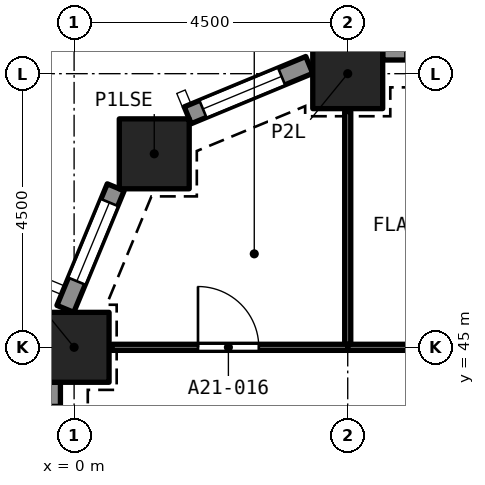
"""IFC4 building model, lengths in metres.
Left out: names, types, materials, properties, quantities, classifications, styles, units other than length and angle.
Written with IfcOpenShell. Run it as: python <this file> out.ifc"""

import sys

from ifc_helpers import new_model, si_unit, direction, frame, frame_2d, origin, origin_2d, place, context, subcontext, project, spatial, rectangle, extrude, element, fill, save


model = new_model("IFC4")
c1 = context("Model", 3, precision=1e-05, world=origin(), true_north=direction((0.0, 1.0)))
c2 = subcontext(c1, "Body", "Model", "MODEL_VIEW")
j1 = project(units=[si_unit("LENGTHUNIT", "METRE"), si_unit("PLANEANGLEUNIT", "RADIAN")], contexts=[c1])
p1 = place(None, origin())
s1 = spatial("IfcSite", under=j1, at=p1, CompositionType="ELEMENT")
p2 = place(p1, origin())
s2 = spatial("IfcBuilding", under=s1, at=p2, CompositionType="ELEMENT")
p3 = place(p2, frame((0.0, 0.0, 80.0)))
s3 = spatial("IfcBuildingStorey", under=s2, at=p3, CompositionType="ELEMENT", Elevation=80.0)
for number, where, z_axis, x_axis in (
    (1, (0.0, 45.0, 0.0), (0.0, 0.0, 1.0), (1.0, 0.0, 0.0)),
    (2, (1.318, 48.182, 0.0), (0.0, 0.0, 1.0), (1.0, 0.0, 0.0)),
    (3, (4.5, 49.5, 0.0), (0.0, 0.0, 1.0), (1.0, 0.0, 0.0)),
):
    element("IfcColumn", number, at=place(p3, frame(where, z_axis=z_axis, x_axis=x_axis)), inside=s3, PredefinedType="COLUMN", context=c2, shape_type="SweptSolid", body=[
        extrude(rectangle(XDim=1.15, YDim=1.15, at=origin_2d()), origin(), (0.0, 0.0, 1.0), 3.2),
    ])
p4 = place(p3, frame((5.075, 49.875, 0.0), z_axis=(0.0, 0.0, 1.0), x_axis=(1.0, 0.0, 0.0)))
e4 = element("IfcWall", 4, at=p4, inside=s3, PredefinedType="SOLIDWALL", context=c2, shape_type="SweptSolid", body=[
    extrude(rectangle(XDim=3.35, YDim=0.3, at=frame_2d((1.675, 0.0))), origin(), (0.0, 0.0, 1.0), 3.2),
])
p5 = place(p4, frame((0.375, 0.0, 0.45)))
e5 = element("IfcOpeningElement", 5, at=p5, cuts=e4, PredefinedType="OPENING", context=c2, shape_type="SweptSolid", body=[
    extrude(rectangle(XDim=2.6, YDim=1.95, at=frame_2d((1.3, 0.975))), frame((0.0, 0.16, 0.0), z_axis=(0.0, -1.0, 0.0), x_axis=(1.0, 0.0, 0.0)), (0.0, 0.0, 1.0), 0.32),
])
p6 = place(p3, frame((1.869, 48.816, 0.0), z_axis=(0.0, 0.0, 1.0), x_axis=(0.923862802911, 0.382723818695, 0.0)))
e6 = element("IfcWall", 6, at=p6, inside=s3, PredefinedType="SOLIDWALL", context=c2, shape_type="SweptSolid", body=[
    extrude(rectangle(XDim=2.164, YDim=0.3, at=frame_2d((1.082, 0.0))), origin(), (0.0, 0.0, 1.0), 3.2),
])
p7 = place(p6, frame((0.271, 0.0, 0.45)))
e7 = element("IfcOpeningElement", 7, at=p7, cuts=e6, PredefinedType="OPENING", context=c2, shape_type="SweptSolid", body=[
    extrude(rectangle(XDim=1.4, YDim=1.95, at=frame_2d((0.7, 0.975))), frame((0.0, 0.16, 0.0), z_axis=(0.0, -1.0, 0.0), x_axis=(1.0, 0.0, 0.0)), (0.0, 0.0, 1.0), 0.32),
])
p8 = place(p3, frame((-0.144, 45.632, 0.0), z_axis=(0.0, 0.0, 1.0), x_axis=(0.382723818695, 0.923862802911, 0.0)))
e8 = element("IfcWall", 8, at=p8, inside=s3, PredefinedType="SOLIDWALL", context=c2, shape_type="SweptSolid", body=[
    extrude(rectangle(XDim=2.164, YDim=0.3, at=frame_2d((1.082, 0.0))), origin(), (0.0, 0.0, 1.0), 3.2),
])
p9 = place(p8, frame((0.493, 0.0, 0.45)))
e9 = element("IfcOpeningElement", 9, at=p9, cuts=e8, PredefinedType="OPENING", context=c2, shape_type="SweptSolid", body=[
    extrude(rectangle(XDim=1.4, YDim=1.95, at=frame_2d((0.7, 0.975))), frame((0.0, 0.16, 0.0), z_axis=(0.0, -1.0, 0.0), x_axis=(1.0, 0.0, 0.0)), (0.0, 0.0, 1.0), 0.32),
])
p10 = place(p3, frame((-0.375, 41.075, 0.0), z_axis=(0.0, 0.0, 1.0), x_axis=(0.0, 1.0, 0.0)))
e10 = element("IfcWall", 10, at=p10, inside=s3, PredefinedType="SOLIDWALL", context=c2, shape_type="SweptSolid", body=[
    extrude(rectangle(XDim=3.35, YDim=0.3, at=frame_2d((1.675, 0.0))), origin(), (0.0, 0.0, 1.0), 3.2),
])
p11 = place(p10, frame((0.375, 0.0, 0.45)))
e11 = element("IfcOpeningElement", 11, at=p11, cuts=e10, PredefinedType="OPENING", context=c2, shape_type="SweptSolid", body=[
    extrude(rectangle(XDim=2.6, YDim=1.95, at=frame_2d((1.3, 0.975))), frame((0.0, 0.16, 0.0), z_axis=(0.0, -1.0, 0.0), x_axis=(1.0, 0.0, 0.0)), (0.0, 0.0, 1.0), 0.32),
])
p12 = place(p3, frame((4.5, 45.0, 0.0), z_axis=(0.0, 0.0, 1.0), x_axis=(1.0, 0.0, 0.0)))
e12 = element("IfcWall", 12, at=p12, inside=s3, PredefinedType="PARTITIONING", context=c2, shape_type="SweptSolid", body=[
    extrude(rectangle(XDim=4.5, YDim=0.1, at=frame_2d((2.25, 0.0))), origin(), (0.0, 0.0, 1.0), 2.9),
])
p13 = place(p12, frame((1.8, 0.0, 0.0)))
e13 = element("IfcOpeningElement", 13, at=p13, cuts=e12, PredefinedType="OPENING", context=c2, shape_type="SweptSolid", body=[
    extrude(rectangle(XDim=0.9, YDim=2.1, at=frame_2d((0.45, 1.05))), frame((0.0, 0.06, 0.0), z_axis=(0.0, -1.0, 0.0), x_axis=(1.0, 0.0, 0.0)), (0.0, 0.0, 1.0), 0.12),
])
p14 = place(p3, frame((4.5, 45.05, 0.0), z_axis=(0.0, 0.0, 1.0), x_axis=(0.0, 1.0, 0.0)))
e14 = element("IfcWall", 14, at=p14, inside=s3, PredefinedType="PARTITIONING", context=c2, shape_type="SweptSolid", body=[
    extrude(rectangle(XDim=3.828, YDim=0.1, at=frame_2d((1.914, 0.0))), origin(), (0.0, 0.0, 1.0), 2.9),
])
p15 = place(p3, frame((0.622, 45.0, 0.0), z_axis=(0.0, 0.0, 1.0), x_axis=(1.0, 0.0, 0.0)))
e15 = element("IfcWall", 15, at=p15, inside=s3, PredefinedType="PARTITIONING", context=c2, shape_type="SweptSolid", body=[
    extrude(rectangle(XDim=3.878, YDim=0.1, at=frame_2d((1.939, 0.0))), origin(), (0.0, 0.0, 1.0), 2.9),
])
p16 = place(p15, frame((1.415, 0.0, 0.0)))
e16 = element("IfcOpeningElement", 16, at=p16, cuts=e15, PredefinedType="OPENING", context=c2, shape_type="SweptSolid", body=[
    extrude(rectangle(XDim=1.0, YDim=2.1, at=frame_2d((0.5, 1.05))), frame((0.0, 0.06, 0.0), z_axis=(0.0, -1.0, 0.0), x_axis=(1.0, 0.0, 0.0)), (0.0, 0.0, 1.0), 0.12),
])
p17 = place(p7, origin())
e17 = element("IfcWindow", 17, at=p17, inside=s3, PartitioningType="SINGLE_PANEL", PredefinedType="WINDOW", context=c2, shape_type="SweptSolid", body=[
    extrude(rectangle(XDim=1.4, YDim=1.95, at=frame_2d((0.7, 0.975))), frame((0.0, 0.03, 0.0), z_axis=(0.0, -1.0, 0.0), x_axis=(1.0, 0.0, 0.0)), (0.0, 0.0, 1.0), 0.06),
])
fill(e7, e17)
p18 = place(p9, origin())
e18 = element("IfcWindow", 18, at=p18, inside=s3, PartitioningType="SINGLE_PANEL", PredefinedType="WINDOW", context=c2, shape_type="SweptSolid", body=[
    extrude(rectangle(XDim=1.4, YDim=1.95, at=frame_2d((0.7, 0.975))), frame((0.0, 0.03, 0.0), z_axis=(0.0, -1.0, 0.0), x_axis=(1.0, 0.0, 0.0)), (0.0, 0.0, 1.0), 0.06),
])
fill(e9, e18)
p19 = place(p16, origin())
e19 = element("IfcDoor", 19, at=p19, inside=s3, OperationType="SINGLE_SWING_LEFT", PredefinedType="DOOR", context=c2, shape_type="SweptSolid", body=[
    extrude(rectangle(XDim=1.0, YDim=2.1, at=frame_2d((0.5, 1.05))), frame((0.0, 0.025, 0.0), z_axis=(0.0, -1.0, 0.0), x_axis=(1.0, 0.0, 0.0)), (0.0, 0.0, 1.0), 0.05),
])
fill(e16, e19)
save(model, sys.argv[1])
